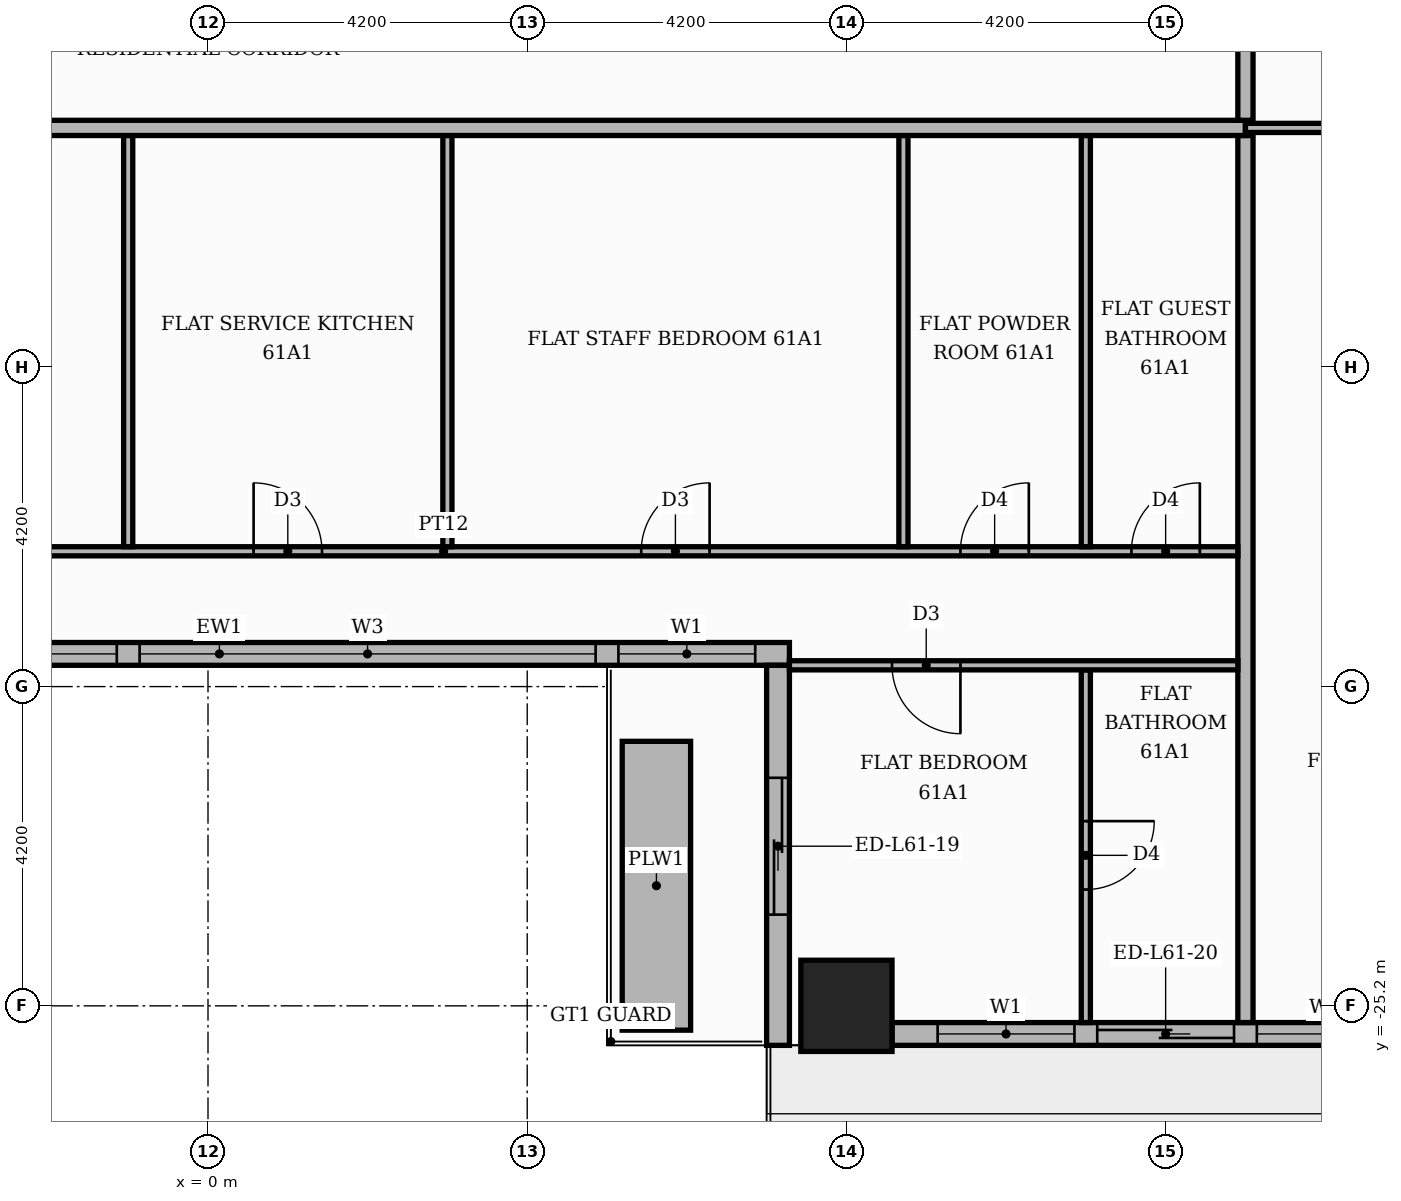
"""IFC4 building model, lengths in metres.
Left out: names, types, materials, properties, quantities, classifications, styles, units other than length and angle.
Written with IfcOpenShell. Run it as: python <this file> out.ifc"""

import sys

from ifc_helpers import new_model, si_unit, direction, frame, frame_2d, origin, origin_2d, place, context, subcontext, project, spatial, rectangle, extrude, element, fill, save


model = new_model("IFC4")
c1 = context("Model", 3, precision=1e-05, world=origin(), true_north=direction((0.0, 1.0)))
c2 = subcontext(c1, "Body", "Model", "MODEL_VIEW")
j1 = project(units=[si_unit("LENGTHUNIT", "METRE"), si_unit("PLANEANGLEUNIT", "RADIAN")], contexts=[c1])
p1 = place(None, origin())
s1 = spatial("IfcSite", under=j1, at=p1, CompositionType="ELEMENT")
p2 = place(p1, origin())
s2 = spatial("IfcBuilding", under=s1, at=p2, CompositionType="ELEMENT")
p3 = place(p2, frame((0.0, 0.0, 256.2)))
s3 = spatial("IfcBuildingStorey", under=s2, at=p3, CompositionType="ELEMENT", Elevation=256.2)
p4 = place(p3, frame((8.4, -25.2, 0.0), z_axis=(0.0, 0.0, 1.0), x_axis=(1.0, 0.0, 0.0)))
e1 = element("IfcColumn", 1, at=p4, inside=s3, PredefinedType="COLUMN", context=c2, shape_type="SweptSolid", body=[
    extrude(rectangle(XDim=1.2, YDim=1.2, at=origin_2d()), origin(), (0.0, 0.0, 1.0), 3.9),
])
p5 = place(p3, frame((-7.35, -20.57, 0.0), z_axis=(0.0, 0.0, 1.0), x_axis=(1.0, 0.0, 0.0)))
e2 = element("IfcWall", 2, at=p5, inside=s3, PredefinedType="STANDARD", context=c2, shape_type="SweptSolid", body=[
    extrude(rectangle(XDim=15.0, YDim=0.3, at=frame_2d((7.5, 0.0))), origin(), (0.0, 0.0, 1.0), 3.48),
])
p6 = place(p5, frame((0.15, 0.0, 0.9)))
e3 = element("IfcOpeningElement", 3, at=p6, cuts=e2, PredefinedType="OPENING", context=c2, shape_type="SweptSolid", body=[
    extrude(rectangle(XDim=6.0, YDim=2.1, at=frame_2d((3.0, 1.05))), frame((0.0, 0.16, 0.0), z_axis=(0.0, -1.0, 0.0), x_axis=(1.0, 0.0, 0.0)), (0.0, 0.0, 1.0), 0.32),
])
p7 = place(p5, frame((6.45, 0.0, 0.9)))
e4 = element("IfcOpeningElement", 4, at=p7, cuts=e2, PredefinedType="OPENING", context=c2, shape_type="SweptSolid", body=[
    extrude(rectangle(XDim=6.0, YDim=2.1, at=frame_2d((3.0, 1.05))), frame((0.0, 0.16, 0.0), z_axis=(0.0, -1.0, 0.0), x_axis=(1.0, 0.0, 0.0)), (0.0, 0.0, 1.0), 0.32),
])
p8 = place(p5, frame((12.75, 0.0, 0.9)))
e5 = element("IfcOpeningElement", 5, at=p8, cuts=e2, PredefinedType="OPENING", context=c2, shape_type="SweptSolid", body=[
    extrude(rectangle(XDim=1.8, YDim=2.1, at=frame_2d((0.9, 1.05))), frame((0.0, 0.16, 0.0), z_axis=(0.0, -1.0, 0.0), x_axis=(1.0, 0.0, 0.0)), (0.0, 0.0, 1.0), 0.32),
])
p9 = place(p3, frame((7.5, -20.72, 0.0), z_axis=(0.0, 0.0, 1.0), x_axis=(0.0, -1.0, 0.0)))
e6 = element("IfcWall", 6, at=p9, inside=s3, PredefinedType="STANDARD", context=c2, shape_type="SweptSolid", body=[
    extrude(rectangle(XDim=5.0, YDim=0.3, at=frame_2d((2.5, 0.0))), origin(), (0.0, 0.0, 1.0), 3.48),
])
p10 = place(p9, frame((1.48, 0.0, 0.0)))
e7 = element("IfcOpeningElement", 7, at=p10, cuts=e6, PredefinedType="OPENING", context=c2, shape_type="SweptSolid", body=[
    extrude(rectangle(XDim=1.8, YDim=2.4, at=frame_2d((0.9, 1.2))), frame((0.0, 0.16, 0.0), z_axis=(0.0, -1.0, 0.0), x_axis=(1.0, 0.0, 0.0)), (0.0, 0.0, 1.0), 0.32),
])
p11 = place(p3, frame((9.0, -25.57, 0.0), z_axis=(0.0, 0.0, 1.0), x_axis=(1.0, 0.0, 0.0)))
e8 = element("IfcWall", 8, at=p11, inside=s3, PredefinedType="STANDARD", context=c2, shape_type="SweptSolid", body=[
    extrude(rectangle(XDim=7.2, YDim=0.3, at=frame_2d((3.6, 0.0))), origin(), (0.0, 0.0, 1.0), 3.48),
])
p12 = place(p11, frame((0.6, 0.0, 0.9)))
e9 = element("IfcOpeningElement", 9, at=p12, cuts=e8, PredefinedType="OPENING", context=c2, shape_type="SweptSolid", body=[
    extrude(rectangle(XDim=1.8, YDim=2.1, at=frame_2d((0.9, 1.05))), frame((0.0, 0.16, 0.0), z_axis=(0.0, -1.0, 0.0), x_axis=(1.0, 0.0, 0.0)), (0.0, 0.0, 1.0), 0.32),
])
p13 = place(p11, frame((2.7, 0.0, 0.0)))
e10 = element("IfcOpeningElement", 10, at=p13, cuts=e8, PredefinedType="OPENING", context=c2, shape_type="SweptSolid", body=[
    extrude(rectangle(XDim=1.8, YDim=2.4, at=frame_2d((0.9, 1.2))), frame((0.0, 0.16, 0.0), z_axis=(0.0, -1.0, 0.0), x_axis=(1.0, 0.0, 0.0)), (0.0, 0.0, 1.0), 0.32),
])
p14 = place(p11, frame((4.8, 0.0, 0.9)))
e11 = element("IfcOpeningElement", 11, at=p14, cuts=e8, PredefinedType="OPENING", context=c2, shape_type="SweptSolid", body=[
    extrude(rectangle(XDim=1.8, YDim=2.1, at=frame_2d((0.9, 1.05))), frame((0.0, 0.16, 0.0), z_axis=(0.0, -1.0, 0.0), x_axis=(1.0, 0.0, 0.0)), (0.0, 0.0, 1.0), 0.32),
])
p15 = place(p3, frame((5.9, -25.52, 0.0), z_axis=(0.0, 0.0, 1.0), x_axis=(0.0, 1.0, 0.0)))
e12 = element("IfcWall", 12, at=p15, inside=s3, PredefinedType="MOVABLE", context=c2, shape_type="SweptSolid", body=[
    extrude(rectangle(XDim=3.8, YDim=0.9, at=frame_2d((1.9, 0.0))), origin(), (0.0, 0.0, 1.0), 0.6),
])
p16 = place(p3, frame((11.55, -25.42, 0.0), z_axis=(0.0, 0.0, 1.0), x_axis=(0.0, 1.0, 0.0)))
e13 = element("IfcWall", 13, at=p16, inside=s3, PredefinedType="PARTITIONING", context=c2, shape_type="SweptSolid", body=[
    extrude(rectangle(XDim=4.64, YDim=0.12, at=frame_2d((2.32, 0.0))), origin(), (0.0, 0.0, 1.0), 3.48),
])
p17 = place(p16, frame((1.75, 0.0, 0.0)))
e14 = element("IfcOpeningElement", 14, at=p17, cuts=e13, PredefinedType="OPENING", context=c2, shape_type="SweptSolid", body=[
    extrude(rectangle(XDim=0.9, YDim=2.1, at=frame_2d((0.45, 1.05))), frame((0.0, 0.07, 0.0), z_axis=(0.0, -1.0, 0.0), x_axis=(1.0, 0.0, 0.0)), (0.0, 0.0, 1.0), 0.14),
])
p18 = place(p3, frame((13.65, -25.42, 0.0), z_axis=(0.0, 0.0, 1.0), x_axis=(0.0, 1.0, 0.0)))
e15 = element("IfcWall", 15, at=p18, inside=s3, PredefinedType="PARTITIONING", context=c2, shape_type="SweptSolid", body=[
    extrude(rectangle(XDim=11.67, YDim=0.2, at=frame_2d((5.835, 0.0))), origin(), (0.0, 0.0, 1.0), 3.48),
])
p19 = place(p3, frame((7.65, -20.72, 0.0), z_axis=(0.0, 0.0, 1.0), x_axis=(1.0, 0.0, 0.0)))
e16 = element("IfcWall", 16, at=p19, inside=s3, PredefinedType="PARTITIONING", context=c2, shape_type="SweptSolid", body=[
    extrude(rectangle(XDim=5.9, YDim=0.12, at=frame_2d((2.95, 0.0))), origin(), (0.0, 0.0, 1.0), 3.48),
])
p20 = place(p19, frame((1.35, 0.0, 0.0)))
e17 = element("IfcOpeningElement", 17, at=p20, cuts=e16, PredefinedType="OPENING", context=c2, shape_type="SweptSolid", body=[
    extrude(rectangle(XDim=0.9, YDim=2.1, at=frame_2d((0.45, 1.05))), frame((0.0, 0.07, 0.0), z_axis=(0.0, -1.0, 0.0), x_axis=(1.0, 0.0, 0.0)), (0.0, 0.0, 1.0), 0.14),
])
p21 = place(p3, frame((-7.35, -19.22, 0.0), z_axis=(0.0, 0.0, 1.0), x_axis=(1.0, 0.0, 0.0)))
e18 = element("IfcWall", 18, at=p21, inside=s3, PredefinedType="PARTITIONING", context=c2, shape_type="SweptSolid", body=[
    extrude(rectangle(XDim=20.9, YDim=0.12, at=frame_2d((10.45, 0.0))), origin(), (0.0, 0.0, 1.0), 3.48),
])
p22 = place(p21, frame((2.7, 0.0, 0.0)))
e19 = element("IfcOpeningElement", 19, at=p22, cuts=e18, PredefinedType="OPENING", context=c2, shape_type="SweptSolid", body=[
    extrude(rectangle(XDim=0.9, YDim=2.1, at=frame_2d((0.45, 1.05))), frame((0.0, 0.07, 0.0), z_axis=(0.0, -1.0, 0.0), x_axis=(1.0, 0.0, 0.0)), (0.0, 0.0, 1.0), 0.14),
])
p23 = place(p21, frame((7.95, 0.0, 0.0)))
e20 = element("IfcOpeningElement", 20, at=p23, cuts=e18, PredefinedType="OPENING", context=c2, shape_type="SweptSolid", body=[
    extrude(rectangle(XDim=0.9, YDim=2.1, at=frame_2d((0.45, 1.05))), frame((0.0, 0.07, 0.0), z_axis=(0.0, -1.0, 0.0), x_axis=(1.0, 0.0, 0.0)), (0.0, 0.0, 1.0), 0.14),
])
p24 = place(p21, frame((13.05, 0.0, 0.0)))
e21 = element("IfcOpeningElement", 21, at=p24, cuts=e18, PredefinedType="OPENING", context=c2, shape_type="SweptSolid", body=[
    extrude(rectangle(XDim=0.9, YDim=2.1, at=frame_2d((0.45, 1.05))), frame((0.0, 0.07, 0.0), z_axis=(0.0, -1.0, 0.0), x_axis=(1.0, 0.0, 0.0)), (0.0, 0.0, 1.0), 0.14),
])
p25 = place(p21, frame((17.25, 0.0, 0.0)))
e22 = element("IfcOpeningElement", 22, at=p25, cuts=e18, PredefinedType="OPENING", context=c2, shape_type="SweptSolid", body=[
    extrude(rectangle(XDim=0.9, YDim=2.1, at=frame_2d((0.45, 1.05))), frame((0.0, 0.07, 0.0), z_axis=(0.0, -1.0, 0.0), x_axis=(1.0, 0.0, 0.0)), (0.0, 0.0, 1.0), 0.14),
])
p26 = place(p21, frame((19.5, 0.0, 0.0)))
e23 = element("IfcOpeningElement", 23, at=p26, cuts=e18, PredefinedType="OPENING", context=c2, shape_type="SweptSolid", body=[
    extrude(rectangle(XDim=0.9, YDim=2.1, at=frame_2d((0.45, 1.05))), frame((0.0, 0.07, 0.0), z_axis=(0.0, -1.0, 0.0), x_axis=(1.0, 0.0, 0.0)), (0.0, 0.0, 1.0), 0.14),
])
for number, where, z_axis, x_axis in (
    (24, (-1.05, -19.16, 0.0), (0.0, 0.0, 1.0), (0.0, 1.0, 0.0)),
    (25, (3.15, -19.16, 0.0), (0.0, 0.0, 1.0), (0.0, 1.0, 0.0)),
    (26, (9.15, -19.16, 0.0), (0.0, 0.0, 1.0), (0.0, 1.0, 0.0)),
    (27, (11.55, -19.16, 0.0), (0.0, 0.0, 1.0), (0.0, 1.0, 0.0)),
):
    element("IfcWall", number, at=place(p3, frame(where, z_axis=z_axis, x_axis=x_axis)), inside=s3, PredefinedType="PARTITIONING", context=c2, shape_type="SweptSolid", body=[
        extrude(rectangle(XDim=5.41, YDim=0.12, at=frame_2d((2.705, 0.0))), origin(), (0.0, 0.0, 1.0), 3.48),
    ])
p27 = place(p3, frame((-25.42, -13.65, 0.0), z_axis=(0.0, 0.0, 1.0), x_axis=(1.0, 0.0, 0.0)))
e28 = element("IfcWall", 28, at=p27, inside=s3, PredefinedType="PARTITIONING", context=c2, shape_type="SweptSolid", body=[
    extrude(rectangle(XDim=39.07, YDim=0.2, at=frame_2d((19.535, 0.0))), origin(), (0.0, 0.0, 1.0), 3.48),
])
p28 = place(p27, frame((14.37, 0.0, 0.0)))
e29 = element("IfcOpeningElement", 29, at=p28, cuts=e28, PredefinedType="OPENING", context=c2, shape_type="SweptSolid", body=[
    extrude(rectangle(XDim=1.1, YDim=2.4, at=frame_2d((0.55, 1.2))), frame((0.0, 0.11, 0.0), z_axis=(0.0, -1.0, 0.0), x_axis=(1.0, 0.0, 0.0)), (0.0, 0.0, 1.0), 0.22),
])
p29 = place(p3, frame((13.65, -13.65, 0.0), z_axis=(0.0, 0.0, 1.0), x_axis=(1.0, 0.0, 0.0)))
e30 = element("IfcWall", 30, at=p29, inside=s3, PredefinedType="PARTITIONING", context=c2, shape_type="SweptSolid", body=[
    extrude(rectangle(XDim=6.47, YDim=0.12, at=frame_2d((3.235, 0.0))), origin(), (0.0, 0.0, 1.0), 3.48),
])
p30 = place(p29, frame((2.785, 0.0, 0.0)))
e31 = element("IfcOpeningElement", 31, at=p30, cuts=e30, PredefinedType="OPENING", context=c2, shape_type="SweptSolid", body=[
    extrude(rectangle(XDim=0.9, YDim=2.1, at=frame_2d((0.45, 1.05))), frame((0.0, 0.07, 0.0), z_axis=(0.0, -1.0, 0.0), x_axis=(1.0, 0.0, 0.0)), (0.0, 0.0, 1.0), 0.14),
])
p31 = place(p3, frame((13.65, -13.55, 0.0), z_axis=(0.0, 0.0, 1.0), x_axis=(0.0, 1.0, 0.0)))
e32 = element("IfcWall", 32, at=p31, inside=s3, PredefinedType="PARTITIONING", context=c2, shape_type="SweptSolid", body=[
    extrude(rectangle(XDim=2.45, YDim=0.2, at=frame_2d((1.225, 0.0))), origin(), (0.0, 0.0, 1.0), 3.48),
])
p32 = place(p6, origin())
e33 = element("IfcWindow", 33, at=p32, inside=s3, PartitioningType="SINGLE_PANEL", PredefinedType="WINDOW", context=c2, shape_type="SweptSolid", body=[
    extrude(rectangle(XDim=6.0, YDim=2.1, at=frame_2d((3.0, 1.05))), frame((0.0, 0.03, 0.0), z_axis=(0.0, -1.0, 0.0), x_axis=(1.0, 0.0, 0.0)), (0.0, 0.0, 1.0), 0.06),
])
fill(e3, e33)
p33 = place(p7, origin())
e34 = element("IfcWindow", 34, at=p33, inside=s3, PartitioningType="SINGLE_PANEL", PredefinedType="WINDOW", context=c2, shape_type="SweptSolid", body=[
    extrude(rectangle(XDim=6.0, YDim=2.1, at=frame_2d((3.0, 1.05))), frame((0.0, 0.03, 0.0), z_axis=(0.0, -1.0, 0.0), x_axis=(1.0, 0.0, 0.0)), (0.0, 0.0, 1.0), 0.06),
])
fill(e4, e34)
p34 = place(p8, origin())
e35 = element("IfcWindow", 35, at=p34, inside=s3, PartitioningType="SINGLE_PANEL", PredefinedType="WINDOW", context=c2, shape_type="SweptSolid", body=[
    extrude(rectangle(XDim=1.8, YDim=2.1, at=frame_2d((0.9, 1.05))), frame((0.0, 0.03, 0.0), z_axis=(0.0, -1.0, 0.0), x_axis=(1.0, 0.0, 0.0)), (0.0, 0.0, 1.0), 0.06),
])
fill(e5, e35)
p35 = place(p10, origin())
e36 = element("IfcDoor", 36, at=p35, inside=s3, OperationType="SLIDING_TO_RIGHT", PredefinedType="DOOR", context=c2, shape_type="SweptSolid", body=[
    extrude(rectangle(XDim=1.8, YDim=2.4, at=frame_2d((0.9, 1.2))), frame((0.0, 0.025, 0.0), z_axis=(0.0, -1.0, 0.0), x_axis=(1.0, 0.0, 0.0)), (0.0, 0.0, 1.0), 0.05),
])
fill(e7, e36)
p36 = place(p12, origin())
e37 = element("IfcWindow", 37, at=p36, inside=s3, PartitioningType="SINGLE_PANEL", PredefinedType="WINDOW", context=c2, shape_type="SweptSolid", body=[
    extrude(rectangle(XDim=1.8, YDim=2.1, at=frame_2d((0.9, 1.05))), frame((0.0, 0.03, 0.0), z_axis=(0.0, -1.0, 0.0), x_axis=(1.0, 0.0, 0.0)), (0.0, 0.0, 1.0), 0.06),
])
fill(e9, e37)
p37 = place(p13, origin())
e38 = element("IfcDoor", 38, at=p37, inside=s3, OperationType="SLIDING_TO_RIGHT", PredefinedType="DOOR", context=c2, shape_type="SweptSolid", body=[
    extrude(rectangle(XDim=1.8, YDim=2.4, at=frame_2d((0.9, 1.2))), frame((0.0, 0.025, 0.0), z_axis=(0.0, -1.0, 0.0), x_axis=(1.0, 0.0, 0.0)), (0.0, 0.0, 1.0), 0.05),
])
fill(e10, e38)
p38 = place(p14, origin())
e39 = element("IfcWindow", 39, at=p38, inside=s3, PartitioningType="SINGLE_PANEL", PredefinedType="WINDOW", context=c2, shape_type="SweptSolid", body=[
    extrude(rectangle(XDim=1.8, YDim=2.1, at=frame_2d((0.9, 1.05))), frame((0.0, 0.03, 0.0), z_axis=(0.0, -1.0, 0.0), x_axis=(1.0, 0.0, 0.0)), (0.0, 0.0, 1.0), 0.06),
])
fill(e11, e39)
p39 = place(p23, origin())
e40 = element("IfcDoor", 40, at=p39, inside=s3, OperationType="SINGLE_SWING_LEFT", PredefinedType="DOOR", context=c2, shape_type="SweptSolid", body=[
    extrude(rectangle(XDim=0.9, YDim=2.1, at=frame_2d((0.45, 1.05))), frame((0.0, 0.025, 0.0), z_axis=(0.0, -1.0, 0.0), x_axis=(1.0, 0.0, 0.0)), (0.0, 0.0, 1.0), 0.05),
])
fill(e20, e40)
p40 = place(p24, origin())
e41 = element("IfcDoor", 41, at=p40, inside=s3, OperationType="SINGLE_SWING_RIGHT", PredefinedType="DOOR", context=c2, shape_type="SweptSolid", body=[
    extrude(rectangle(XDim=0.9, YDim=2.1, at=frame_2d((0.45, 1.05))), frame((0.0, 0.025, 0.0), z_axis=(0.0, -1.0, 0.0), x_axis=(1.0, 0.0, 0.0)), (0.0, 0.0, 1.0), 0.05),
])
fill(e21, e41)
p41 = place(p25, origin())
e42 = element("IfcDoor", 42, at=p41, inside=s3, OperationType="SINGLE_SWING_RIGHT", PredefinedType="DOOR", context=c2, shape_type="SweptSolid", body=[
    extrude(rectangle(XDim=0.9, YDim=2.1, at=frame_2d((0.45, 1.05))), frame((0.0, 0.025, 0.0), z_axis=(0.0, -1.0, 0.0), x_axis=(1.0, 0.0, 0.0)), (0.0, 0.0, 1.0), 0.05),
])
fill(e22, e42)
p42 = place(p26, origin())
e43 = element("IfcDoor", 43, at=p42, inside=s3, OperationType="SINGLE_SWING_RIGHT", PredefinedType="DOOR", context=c2, shape_type="SweptSolid", body=[
    extrude(rectangle(XDim=0.9, YDim=2.1, at=frame_2d((0.45, 1.05))), frame((0.0, 0.025, 0.0), z_axis=(0.0, -1.0, 0.0), x_axis=(1.0, 0.0, 0.0)), (0.0, 0.0, 1.0), 0.05),
])
fill(e23, e43)
p43 = place(p20, frame((0.9, 0.0, 0.0), z_axis=(0.0, 0.0, 1.0), x_axis=(-1.0, 0.0, 0.0)))
e44 = element("IfcDoor", 44, at=p43, inside=s3, OperationType="SINGLE_SWING_RIGHT", PredefinedType="DOOR", context=c2, shape_type="SweptSolid", body=[
    extrude(rectangle(XDim=0.9, YDim=2.1, at=frame_2d((0.45, 1.05))), frame((0.0, 0.025, 0.0), z_axis=(0.0, -1.0, 0.0), x_axis=(1.0, 0.0, 0.0)), (0.0, 0.0, 1.0), 0.05),
])
fill(e17, e44)
p44 = place(p17, frame((0.9, 0.0, 0.0), z_axis=(0.0, 0.0, 1.0), x_axis=(-1.0, 0.0, 0.0)))
e45 = element("IfcDoor", 45, at=p44, inside=s3, OperationType="SINGLE_SWING_RIGHT", PredefinedType="DOOR", context=c2, shape_type="SweptSolid", body=[
    extrude(rectangle(XDim=0.9, YDim=2.1, at=frame_2d((0.45, 1.05))), frame((0.0, 0.025, 0.0), z_axis=(0.0, -1.0, 0.0), x_axis=(1.0, 0.0, 0.0)), (0.0, 0.0, 1.0), 0.05),
])
fill(e14, e45)
save(model, sys.argv[1])
